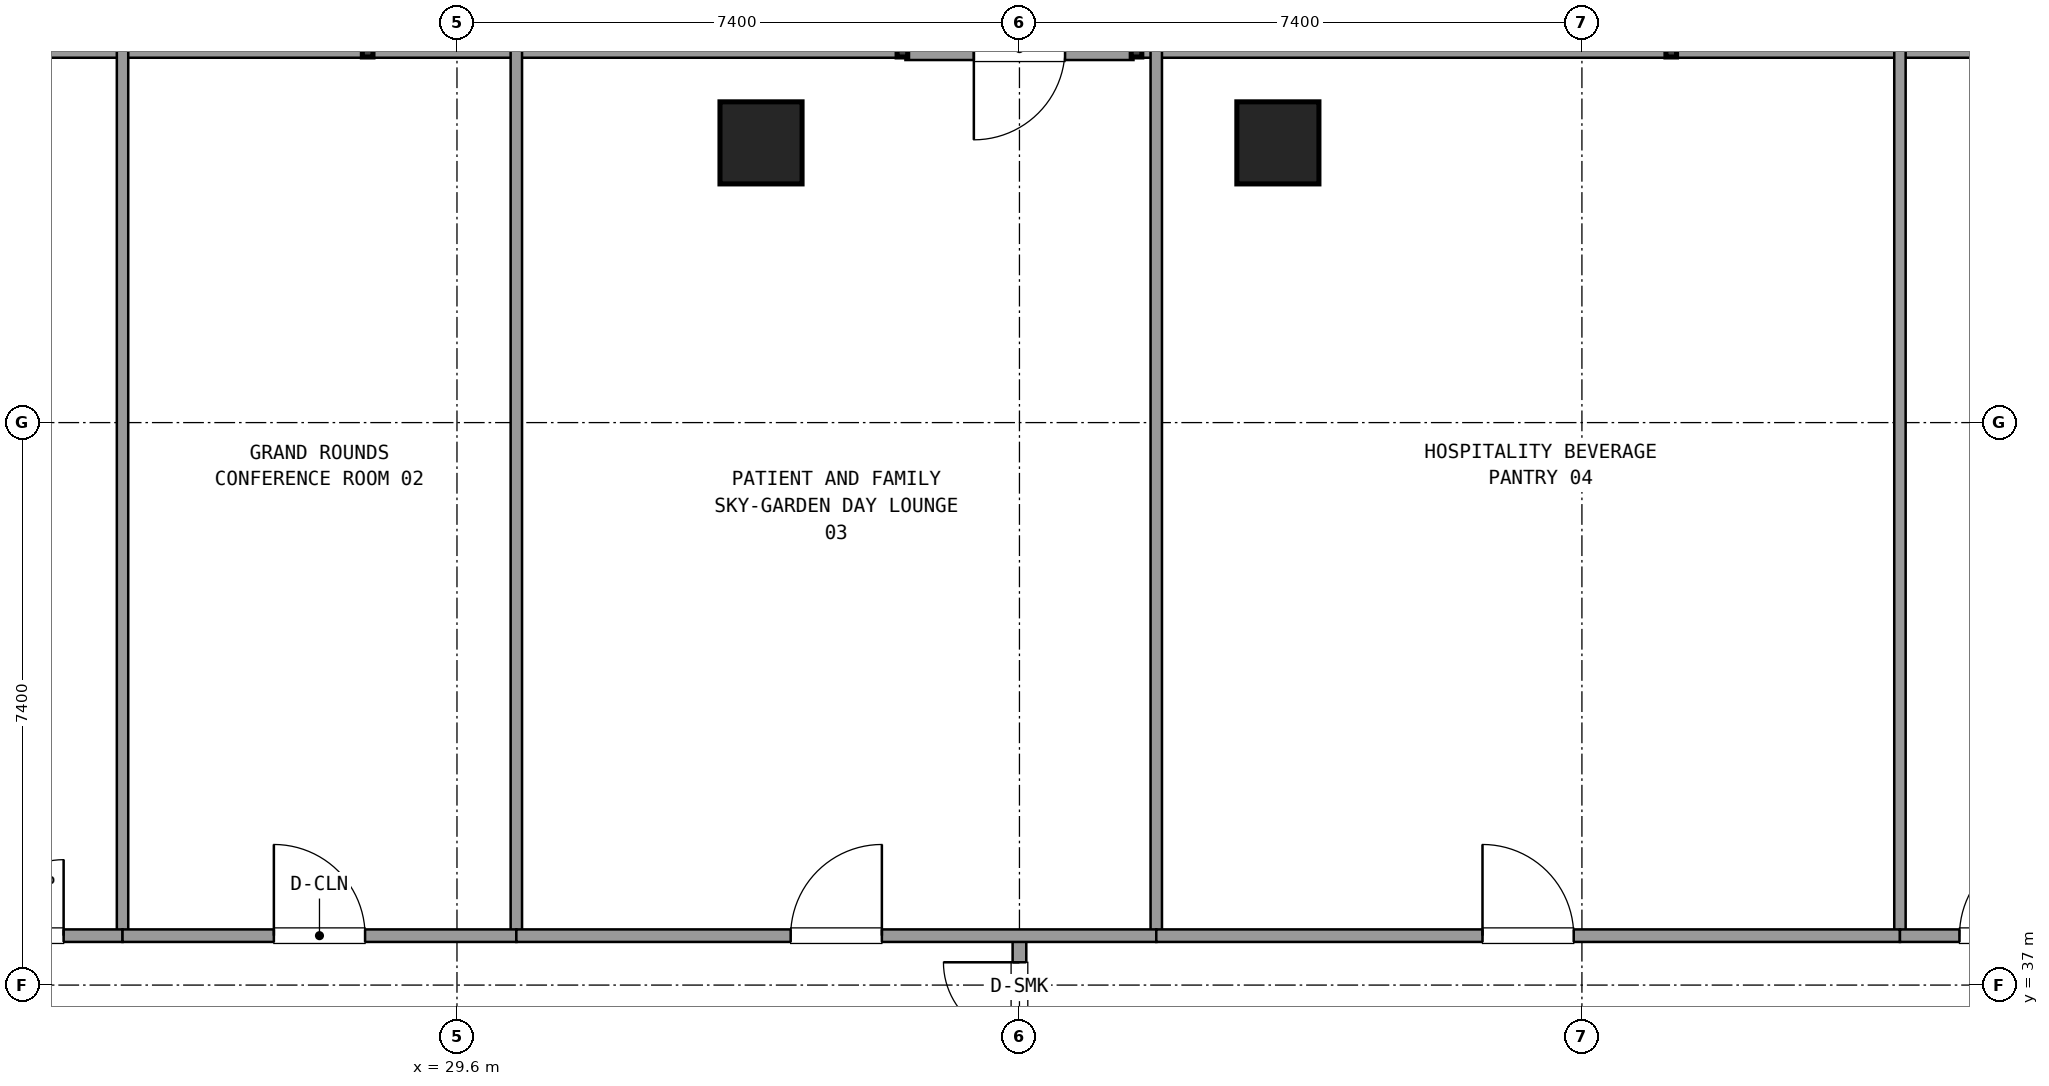
"""IFC4 building model, lengths in metres.
Left out: names, types, materials, properties, quantities, classifications, styles, units other than length and angle.
Written with IfcOpenShell. Run it as: python <this file> out.ifc"""

import sys

from ifc_helpers import new_model, si_unit, direction, frame, frame_2d, origin, origin_2d, place, context, subcontext, project, spatial, rectangle, extrude, element, fill, save


model = new_model("IFC4")
c1 = context("Model", 3, precision=1e-05, world=origin(), true_north=direction((0.0, 1.0)))
c2 = subcontext(c1, "Body", "Model", "MODEL_VIEW")
j1 = project(units=[si_unit("LENGTHUNIT", "METRE"), si_unit("PLANEANGLEUNIT", "RADIAN")], contexts=[c1])
p1 = place(None, origin())
s1 = spatial("IfcSite", under=j1, at=p1, CompositionType="ELEMENT")
p2 = place(p1, origin())
s2 = spatial("IfcBuilding", under=s1, at=p2, CompositionType="ELEMENT")
p3 = place(p2, frame((0.0, 0.0, 52.74)))
s3 = spatial("IfcBuildingStorey", under=s2, at=p3, CompositionType="ELEMENT", Elevation=52.74)
for number, where, z_axis, x_axis in (
    (1, (40.4, 48.08, 0.0), (0.0, 0.0, 1.0), (1.0, 0.0, 0.0)),
    (2, (33.6, 48.08, 0.0), (0.0, 0.0, 1.0), (1.0, 0.0, 0.0)),
):
    element("IfcColumn", number, at=place(p3, frame(where, z_axis=z_axis, x_axis=x_axis)), inside=s3, PredefinedType="COLUMN", context=c2, shape_type="SweptSolid", body=[
        extrude(rectangle(XDim=1.08, YDim=1.08, at=origin_2d()), origin(), (0.0, 0.0, 1.0), 3.6),
    ])
p4 = place(p3, frame((38.5, 49.32, 0.0), z_axis=(0.0, 0.0, 1.0), x_axis=(-1.0, 0.0, 0.0)))
e3 = element("IfcWall", 3, at=p4, inside=s3, PredefinedType="SOLIDWALL", context=c2, shape_type="SweptSolid", body=[
    extrude(rectangle(XDim=3.0, YDim=0.3, at=frame_2d((1.5, 0.0))), origin(), (0.0, 0.0, 1.0), 2.65),
])
p5 = place(p4, frame((0.9, 0.0, 0.0)))
e4 = element("IfcOpeningElement", 4, at=p5, cuts=e3, PredefinedType="OPENING", context=c2, shape_type="SweptSolid", body=[
    extrude(rectangle(XDim=1.2, YDim=2.2, at=frame_2d((0.6, 1.1))), frame((0.0, 0.16, 0.0), z_axis=(0.0, -1.0, 0.0), x_axis=(1.0, 0.0, 0.0)), (0.0, 0.0, 1.0), 0.32),
])
for number, where, z_axis, x_axis in (
    (5, (59.645, 49.32, 0.0), (0.0, 0.0, 1.0), (-1.0, 0.0, 0.0)),
    (6, (35.46, 49.32, 0.0), (0.0, 0.0, 1.0), (-1.0, 0.0, 0.0)),
):
    element("IfcWall", number, at=place(p3, frame(where, z_axis=z_axis, x_axis=x_axis)), inside=s3, PredefinedType="SOLIDWALL", context=c2, shape_type="SweptSolid", body=[
        extrude(rectangle(XDim=21.105, YDim=0.24, at=frame_2d((10.552, 0.0))), origin(), (0.0, 0.0, 1.0), 0.85),
    ])
p6 = place(p3, frame((37.0, 34.95, 0.0), z_axis=(0.0, 0.0, 1.0), x_axis=(0.0, 1.0, 0.0)))
e7 = element("IfcWall", 7, at=p6, inside=s3, PredefinedType="PARTITIONING", context=c2, shape_type="SweptSolid", body=[
    extrude(rectangle(XDim=2.7, YDim=0.18, at=frame_2d((1.35, 0.0))), origin(), (0.0, 0.0, 1.0), 2.61),
])
p7 = place(p6, frame((0.35, 0.0, 0.0)))
e8 = element("IfcOpeningElement", 8, at=p7, cuts=e7, PredefinedType="OPENING", context=c2, shape_type="SweptSolid", body=[
    extrude(rectangle(XDim=2.0, YDim=2.2, at=frame_2d((1.0, 1.1))), frame((0.0, 0.1, 0.0), z_axis=(0.0, -1.0, 0.0), x_axis=(1.0, 0.0, 0.0)), (0.0, 0.0, 1.0), 0.2),
])
p8 = place(p3, frame((25.2, 37.65, 0.0), z_axis=(0.0, 0.0, 1.0), x_axis=(0.0, 1.0, 0.0)))
e9 = element("IfcWall", 9, at=p8, inside=s3, PredefinedType="PARTITIONING", context=c2, shape_type="SweptSolid", body=[
    extrude(rectangle(XDim=11.65, YDim=0.15, at=frame_2d((5.825, 0.0))), origin(), (0.0, 0.0, 1.0), 2.61),
])
p9 = place(p3, frame((22.65, 37.65, 0.0), z_axis=(0.0, 0.0, 1.0), x_axis=(1.0, 0.0, 0.0)))
e10 = element("IfcWall", 10, at=p9, inside=s3, PredefinedType="PARTITIONING", context=c2, shape_type="SweptSolid", body=[
    extrude(rectangle(XDim=2.55, YDim=0.165, at=frame_2d((1.275, 0.0))), origin(), (0.0, 0.0, 1.0), 2.61),
])
p10 = place(p9, frame((0.775, 0.0, 0.0)))
e11 = element("IfcOpeningElement", 11, at=p10, cuts=e10, PredefinedType="OPENING", context=c2, shape_type="SweptSolid", body=[
    extrude(rectangle(XDim=1.0, YDim=2.15, at=frame_2d((0.5, 1.075))), frame((0.0, 0.093, 0.0), z_axis=(0.0, -1.0, 0.0), x_axis=(1.0, 0.0, 0.0)), (0.0, 0.0, 1.0), 0.185),
])
p11 = place(p3, frame((30.381, 37.65, 0.0), z_axis=(0.0, 0.0, 1.0), x_axis=(0.0, 1.0, 0.0)))
e12 = element("IfcWall", 12, at=p11, inside=s3, PredefinedType="PARTITIONING", context=c2, shape_type="SweptSolid", body=[
    extrude(rectangle(XDim=11.65, YDim=0.15, at=frame_2d((5.825, 0.0))), origin(), (0.0, 0.0, 1.0), 2.61),
])
p12 = place(p3, frame((25.2, 37.65, 0.0), z_axis=(0.0, 0.0, 1.0), x_axis=(1.0, 0.0, 0.0)))
e13 = element("IfcWall", 13, at=p12, inside=s3, PredefinedType="PARTITIONING", context=c2, shape_type="SweptSolid", body=[
    extrude(rectangle(XDim=5.181, YDim=0.165, at=frame_2d((2.591, 0.0))), origin(), (0.0, 0.0, 1.0), 2.61),
])
p13 = place(p12, frame((1.991, 0.0, 0.0)))
e14 = element("IfcOpeningElement", 14, at=p13, cuts=e13, PredefinedType="OPENING", context=c2, shape_type="SweptSolid", body=[
    extrude(rectangle(XDim=1.2, YDim=2.15, at=frame_2d((0.6, 1.075))), frame((0.0, 0.093, 0.0), z_axis=(0.0, -1.0, 0.0), x_axis=(1.0, 0.0, 0.0)), (0.0, 0.0, 1.0), 0.185),
])
p14 = place(p3, frame((38.8, 37.65, 0.0), z_axis=(0.0, 0.0, 1.0), x_axis=(0.0, 1.0, 0.0)))
e15 = element("IfcWall", 15, at=p14, inside=s3, PredefinedType="PARTITIONING", context=c2, shape_type="SweptSolid", body=[
    extrude(rectangle(XDim=11.65, YDim=0.15, at=frame_2d((5.825, 0.0))), origin(), (0.0, 0.0, 1.0), 2.61),
])
p15 = place(p3, frame((30.381, 37.65, 0.0), z_axis=(0.0, 0.0, 1.0), x_axis=(1.0, 0.0, 0.0)))
e16 = element("IfcWall", 16, at=p15, inside=s3, PredefinedType="PARTITIONING", context=c2, shape_type="SweptSolid", body=[
    extrude(rectangle(XDim=8.419, YDim=0.165, at=frame_2d((4.209, 0.0))), origin(), (0.0, 0.0, 1.0), 2.61),
])
p16 = place(p15, frame((3.609, 0.0, 0.0)))
e17 = element("IfcOpeningElement", 17, at=p16, cuts=e16, PredefinedType="OPENING", context=c2, shape_type="SweptSolid", body=[
    extrude(rectangle(XDim=1.2, YDim=2.15, at=frame_2d((0.6, 1.075))), frame((0.0, 0.093, 0.0), z_axis=(0.0, -1.0, 0.0), x_axis=(1.0, 0.0, 0.0)), (0.0, 0.0, 1.0), 0.185),
])
p17 = place(p3, frame((48.584, 37.65, 0.0), z_axis=(0.0, 0.0, 1.0), x_axis=(0.0, 1.0, 0.0)))
e18 = element("IfcWall", 18, at=p17, inside=s3, PredefinedType="PARTITIONING", context=c2, shape_type="SweptSolid", body=[
    extrude(rectangle(XDim=11.65, YDim=0.15, at=frame_2d((5.825, 0.0))), origin(), (0.0, 0.0, 1.0), 2.61),
])
p18 = place(p3, frame((38.8, 37.65, 0.0), z_axis=(0.0, 0.0, 1.0), x_axis=(1.0, 0.0, 0.0)))
e19 = element("IfcWall", 19, at=p18, inside=s3, PredefinedType="PARTITIONING", context=c2, shape_type="SweptSolid", body=[
    extrude(rectangle(XDim=9.784, YDim=0.165, at=frame_2d((4.892, 0.0))), origin(), (0.0, 0.0, 1.0), 2.61),
])
p19 = place(p18, frame((4.292, 0.0, 0.0)))
e20 = element("IfcOpeningElement", 20, at=p19, cuts=e19, PredefinedType="OPENING", context=c2, shape_type="SweptSolid", body=[
    extrude(rectangle(XDim=1.2, YDim=2.15, at=frame_2d((0.6, 1.075))), frame((0.0, 0.093, 0.0), z_axis=(0.0, -1.0, 0.0), x_axis=(1.0, 0.0, 0.0)), (0.0, 0.0, 1.0), 0.185),
])
p20 = place(p3, frame((48.584, 37.65, 0.0), z_axis=(0.0, 0.0, 1.0), x_axis=(1.0, 0.0, 0.0)))
e21 = element("IfcWall", 21, at=p20, inside=s3, PredefinedType="PARTITIONING", context=c2, shape_type="SweptSolid", body=[
    extrude(rectangle(XDim=2.766, YDim=0.165, at=frame_2d((1.383, 0.0))), origin(), (0.0, 0.0, 1.0), 2.61),
])
p21 = place(p20, frame((0.783, 0.0, 0.0)))
e22 = element("IfcOpeningElement", 22, at=p21, cuts=e21, PredefinedType="OPENING", context=c2, shape_type="SweptSolid", body=[
    extrude(rectangle(XDim=1.2, YDim=2.15, at=frame_2d((0.6, 1.075))), frame((0.0, 0.093, 0.0), z_axis=(0.0, -1.0, 0.0), x_axis=(1.0, 0.0, 0.0)), (0.0, 0.0, 1.0), 0.185),
])
p22 = place(p7, origin())
e23 = element("IfcDoor", 23, at=p22, inside=s3, OperationType="DOUBLE_DOOR_SINGLE_SWING", PredefinedType="DOOR", context=c2, shape_type="SweptSolid", body=[
    extrude(rectangle(XDim=2.0, YDim=2.2, at=frame_2d((1.0, 1.1))), frame((0.0, 0.025, 0.0), z_axis=(0.0, -1.0, 0.0), x_axis=(1.0, 0.0, 0.0)), (0.0, 0.0, 1.0), 0.05),
])
fill(e8, e23)
p23 = place(p10, origin())
e24 = element("IfcDoor", 24, at=p23, inside=s3, OperationType="SINGLE_SWING_RIGHT", PredefinedType="DOOR", context=c2, shape_type="SweptSolid", body=[
    extrude(rectangle(XDim=1.0, YDim=2.15, at=frame_2d((0.5, 1.075))), frame((0.0, 0.025, 0.0), z_axis=(0.0, -1.0, 0.0), x_axis=(1.0, 0.0, 0.0)), (0.0, 0.0, 1.0), 0.05),
])
fill(e11, e24)
p24 = place(p13, origin())
e25 = element("IfcDoor", 25, at=p24, inside=s3, OperationType="SINGLE_SWING_LEFT", PredefinedType="DOOR", context=c2, shape_type="SweptSolid", body=[
    extrude(rectangle(XDim=1.2, YDim=2.15, at=frame_2d((0.6, 1.075))), frame((0.0, 0.025, 0.0), z_axis=(0.0, -1.0, 0.0), x_axis=(1.0, 0.0, 0.0)), (0.0, 0.0, 1.0), 0.05),
])
fill(e14, e25)
p25 = place(p16, origin())
e26 = element("IfcDoor", 26, at=p25, inside=s3, OperationType="SINGLE_SWING_RIGHT", PredefinedType="DOOR", context=c2, shape_type="SweptSolid", body=[
    extrude(rectangle(XDim=1.2, YDim=2.15, at=frame_2d((0.6, 1.075))), frame((0.0, 0.025, 0.0), z_axis=(0.0, -1.0, 0.0), x_axis=(1.0, 0.0, 0.0)), (0.0, 0.0, 1.0), 0.05),
])
fill(e17, e26)
p26 = place(p19, origin())
e27 = element("IfcDoor", 27, at=p26, inside=s3, OperationType="SINGLE_SWING_LEFT", PredefinedType="DOOR", context=c2, shape_type="SweptSolid", body=[
    extrude(rectangle(XDim=1.2, YDim=2.15, at=frame_2d((0.6, 1.075))), frame((0.0, 0.025, 0.0), z_axis=(0.0, -1.0, 0.0), x_axis=(1.0, 0.0, 0.0)), (0.0, 0.0, 1.0), 0.05),
])
fill(e20, e27)
p27 = place(p21, origin())
e28 = element("IfcDoor", 28, at=p27, inside=s3, OperationType="SINGLE_SWING_RIGHT", PredefinedType="DOOR", context=c2, shape_type="SweptSolid", body=[
    extrude(rectangle(XDim=1.2, YDim=2.15, at=frame_2d((0.6, 1.075))), frame((0.0, 0.025, 0.0), z_axis=(0.0, -1.0, 0.0), x_axis=(1.0, 0.0, 0.0)), (0.0, 0.0, 1.0), 0.05),
])
fill(e22, e28)
save(model, sys.argv[1])
